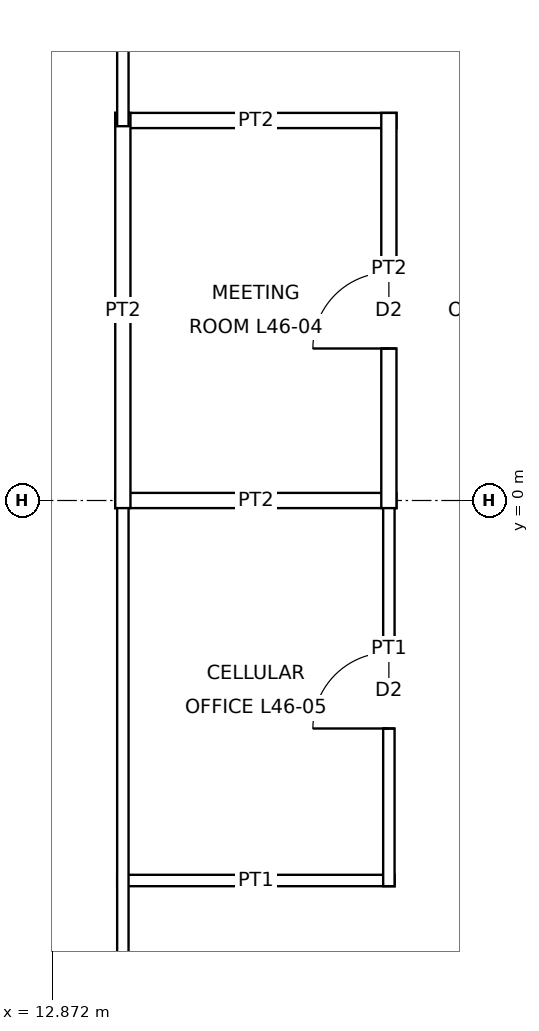
"""IFC4 building model, lengths in metres.
Left out: names, types, materials, properties, quantities, classifications, styles, units other than length and angle.
Written with IfcOpenShell. Run it as: python <this file> out.ifc"""

import sys

from ifc_helpers import new_model, si_unit, direction, frame, frame_2d, origin, place, context, subcontext, project, spatial, rectangle, extrude, element, fill, save


model = new_model("IFC4")
c1 = context("Model", 3, precision=1e-05, world=origin(), true_north=direction((0.0, 1.0)))
c2 = subcontext(c1, "Body", "Model", "MODEL_VIEW")
j1 = project(units=[si_unit("LENGTHUNIT", "METRE"), si_unit("PLANEANGLEUNIT", "RADIAN")], contexts=[c1])
p1 = place(None, origin())
s1 = spatial("IfcSite", under=j1, at=p1, CompositionType="ELEMENT")
p2 = place(p1, origin())
s2 = spatial("IfcBuilding", under=s1, at=p2, CompositionType="ELEMENT")
p3 = place(p2, frame((0.0, 0.0, 217.9)))
s3 = spatial("IfcBuildingStorey", under=s2, at=p3, CompositionType="ELEMENT", Elevation=217.9)
p4 = place(p3, frame((13.725, -5.0, 0.0), z_axis=(0.0, 0.0, 1.0), x_axis=(1.0, 0.0, 0.0)))
e1 = element("IfcWall", 1, at=p4, inside=s3, PredefinedType="PARTITIONING", context=c2, shape_type="SweptSolid", body=[
    extrude(rectangle(XDim=3.65, YDim=0.15, at=frame_2d((1.825, 0.0))), origin(), (0.0, 0.0, 1.0), 3.85),
])
p5 = place(p3, frame((13.7, 0.0, 0.0), z_axis=(0.0, 0.0, 1.0), x_axis=(1.0, 0.0, 0.0)))
e2 = element("IfcWall", 2, at=p5, inside=s3, PredefinedType="PARTITIONING", context=c2, shape_type="SweptSolid", body=[
    extrude(rectangle(XDim=3.7, YDim=0.2, at=frame_2d((1.85, 0.0))), origin(), (0.0, 0.0, 1.0), 3.238),
])
p6 = place(p3, frame((13.7, 5.0, 0.0), z_axis=(0.0, 0.0, 1.0), x_axis=(1.0, 0.0, 0.0)))
e3 = element("IfcWall", 3, at=p6, inside=s3, PredefinedType="PARTITIONING", context=c2, shape_type="SweptSolid", body=[
    extrude(rectangle(XDim=3.7, YDim=0.2, at=frame_2d((1.85, 0.0))), origin(), (0.0, 0.0, 1.0), 3.85),
])
p7 = place(p3, frame((13.8, -13.875, 0.0), z_axis=(0.0, 0.0, 1.0), x_axis=(0.0, 1.0, 0.0)))
e4 = element("IfcWall", 4, at=p7, inside=s3, PredefinedType="PARTITIONING", context=c2, shape_type="SweptSolid", body=[
    extrude(rectangle(XDim=13.95, YDim=0.15, at=frame_2d((6.975, 0.0))), origin(), (0.0, 0.0, 1.0), 3.85),
])
p8 = place(p3, frame((13.8, -0.1, 0.0), z_axis=(0.0, 0.0, 1.0), x_axis=(0.0, 1.0, 0.0)))
e5 = element("IfcWall", 5, at=p8, inside=s3, PredefinedType="PARTITIONING", context=c2, shape_type="SweptSolid", body=[
    extrude(rectangle(XDim=5.2, YDim=0.2, at=frame_2d((2.6, 0.0))), origin(), (0.0, 0.0, 1.0), 3.85),
])
p9 = place(p3, frame((13.8, 4.925, 0.0), z_axis=(0.0, 0.0, 1.0), x_axis=(0.0, 1.0, 0.0)))
e6 = element("IfcWall", 6, at=p9, inside=s3, PredefinedType="PARTITIONING", context=c2, shape_type="SweptSolid", body=[
    extrude(rectangle(XDim=7.15, YDim=0.15, at=frame_2d((3.575, 0.0))), origin(), (0.0, 0.0, 1.0), 3.85),
])
p10 = place(p3, frame((17.3, -5.075, 0.0), z_axis=(0.0, 0.0, 1.0), x_axis=(0.0, 1.0, 0.0)))
e7 = element("IfcWall", 7, at=p10, inside=s3, PredefinedType="PARTITIONING", context=c2, shape_type="SweptSolid", body=[
    extrude(rectangle(XDim=5.15, YDim=0.15, at=frame_2d((2.575, 0.0))), origin(), (0.0, 0.0, 1.0), 3.85),
])
p11 = place(p10, frame((2.075, 0.0, 0.0)))
e8 = element("IfcOpeningElement", 8, at=p11, cuts=e7, PredefinedType="OPENING", context=c2, shape_type="SweptSolid", body=[
    extrude(rectangle(XDim=1.0, YDim=2.1, at=frame_2d((0.5, 1.05))), frame((0.0, 0.085, 0.0), z_axis=(0.0, -1.0, 0.0), x_axis=(1.0, 0.0, 0.0)), (0.0, 0.0, 1.0), 0.17),
])
p12 = place(p3, frame((17.3, -0.1, 0.0), z_axis=(0.0, 0.0, 1.0), x_axis=(0.0, 1.0, 0.0)))
e9 = element("IfcWall", 9, at=p12, inside=s3, PredefinedType="PARTITIONING", context=c2, shape_type="SweptSolid", body=[
    extrude(rectangle(XDim=5.2, YDim=0.2, at=frame_2d((2.6, 0.0))), origin(), (0.0, 0.0, 1.0), 3.85),
])
p13 = place(p12, frame((2.1, 0.0, 0.0)))
e10 = element("IfcOpeningElement", 10, at=p13, cuts=e9, PredefinedType="OPENING", context=c2, shape_type="SweptSolid", body=[
    extrude(rectangle(XDim=1.0, YDim=2.1, at=frame_2d((0.5, 1.05))), frame((0.0, 0.11, 0.0), z_axis=(0.0, -1.0, 0.0), x_axis=(1.0, 0.0, 0.0)), (0.0, 0.0, 1.0), 0.22),
])
p14 = place(p13, origin())
e11 = element("IfcDoor", 11, at=p14, inside=s3, OperationType="SINGLE_SWING_LEFT", PredefinedType="DOOR", context=c2, shape_type="SweptSolid", body=[
    extrude(rectangle(XDim=1.0, YDim=2.1, at=frame_2d((0.5, 1.05))), frame((0.0, 0.025, 0.0), z_axis=(0.0, -1.0, 0.0), x_axis=(1.0, 0.0, 0.0)), (0.0, 0.0, 1.0), 0.05),
])
fill(e10, e11)
p15 = place(p11, origin())
e12 = element("IfcDoor", 12, at=p15, inside=s3, OperationType="SINGLE_SWING_LEFT", PredefinedType="DOOR", context=c2, shape_type="SweptSolid", body=[
    extrude(rectangle(XDim=1.0, YDim=2.1, at=frame_2d((0.5, 1.05))), frame((0.0, 0.025, 0.0), z_axis=(0.0, -1.0, 0.0), x_axis=(1.0, 0.0, 0.0)), (0.0, 0.0, 1.0), 0.05),
])
fill(e8, e12)
save(model, sys.argv[1])
